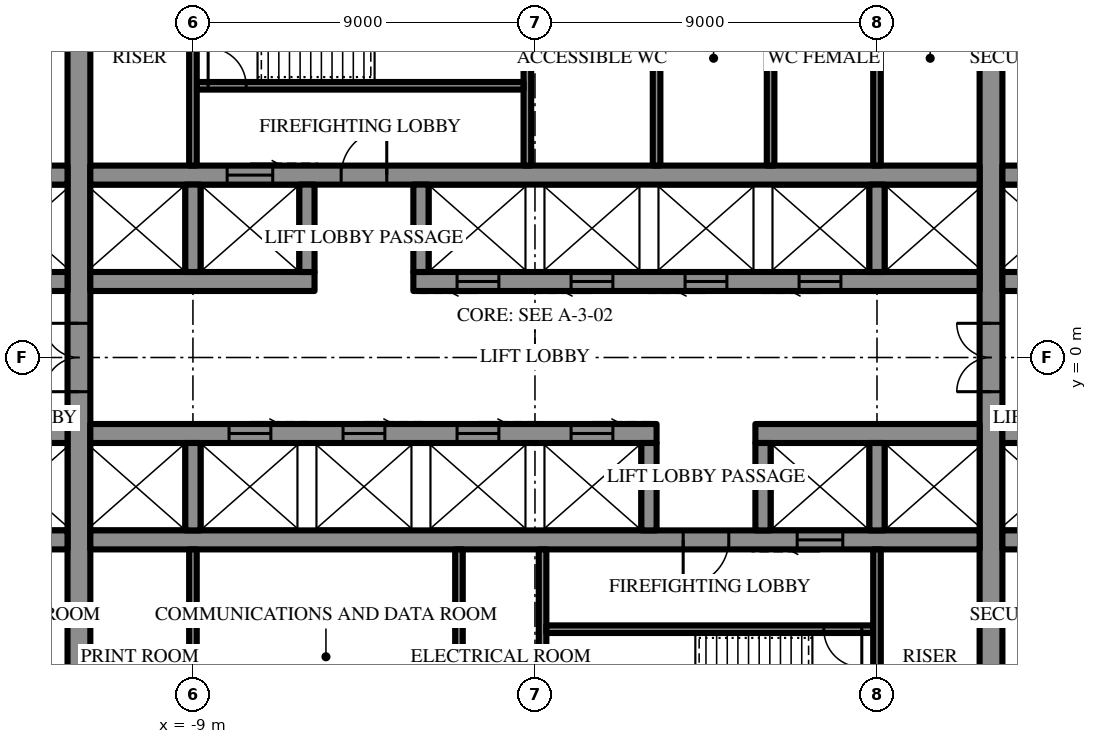
"""IFC4 building model, lengths in metres.
Left out: names, types, materials, properties, quantities, classifications, styles, units other than length and angle.
Written with IfcOpenShell. Run it as: python <this file> out.ifc"""

import sys

from ifc_helpers import new_model, si_unit, direction, frame, frame_2d, origin, place, context, subcontext, project, spatial, rectangle, extrude, element, fill, save


model = new_model("IFC4")
c1 = context("Model", 3, precision=1e-05, world=origin(), true_north=direction((0.0, 1.0)))
c2 = subcontext(c1, "Body", "Model", "MODEL_VIEW")
j1 = project(units=[si_unit("LENGTHUNIT", "METRE"), si_unit("PLANEANGLEUNIT", "RADIAN")], contexts=[c1])
p1 = place(None, origin())
s1 = spatial("IfcSite", under=j1, at=p1, CompositionType="ELEMENT")
p2 = place(p1, origin())
s2 = spatial("IfcBuilding", under=s1, at=p2, CompositionType="ELEMENT")
p3 = place(p2, frame((0.0, 0.0, 123.7)))
s3 = spatial("IfcBuildingStorey", under=s2, at=p3, CompositionType="ELEMENT", Elevation=123.7)
p4 = place(p3, frame((12.0, -10.7, 0.0), z_axis=(0.0, 0.0, 1.0), x_axis=(0.0, 1.0, 0.0)))
e1 = element("IfcWall", 1, at=p4, inside=s3, PredefinedType="SHEAR", context=c2, shape_type="SweptSolid", body=[
    extrude(rectangle(XDim=21.4, YDim=0.6, at=frame_2d((10.7, 0.0))), origin(), (0.0, 0.0, 1.0), 4.2),
])
p5 = place(p4, frame((9.8, 0.0, 0.0)))
e2 = element("IfcOpeningElement", 2, at=p5, cuts=e1, PredefinedType="OPENING", context=c2, shape_type="SweptSolid", body=[
    extrude(rectangle(XDim=1.8, YDim=2.4, at=frame_2d((0.9, 1.2))), frame((0.0, 0.31, 0.0), z_axis=(0.0, -1.0, 0.0), x_axis=(1.0, 0.0, 0.0)), (0.0, 0.0, 1.0), 0.62),
])
p6 = place(p3, frame((-12.0, -10.7, 0.0), z_axis=(0.0, 0.0, 1.0), x_axis=(0.0, 1.0, 0.0)))
e3 = element("IfcWall", 3, at=p6, inside=s3, PredefinedType="SHEAR", context=c2, shape_type="SweptSolid", body=[
    extrude(rectangle(XDim=21.4, YDim=0.6, at=frame_2d((10.7, 0.0))), origin(), (0.0, 0.0, 1.0), 4.2),
])
p7 = place(p6, frame((9.8, 0.0, 0.0)))
e4 = element("IfcOpeningElement", 4, at=p7, cuts=e3, PredefinedType="OPENING", context=c2, shape_type="SweptSolid", body=[
    extrude(rectangle(XDim=1.8, YDim=2.4, at=frame_2d((0.9, 1.2))), frame((0.0, 0.31, 0.0), z_axis=(0.0, -1.0, 0.0), x_axis=(1.0, 0.0, 0.0)), (0.0, 0.0, 1.0), 0.62),
])
p8 = place(p3, frame((-14.7, 2.0, 0.0), z_axis=(0.0, 0.0, 1.0), x_axis=(1.0, 0.0, 0.0)))
e5 = element("IfcWall", 5, at=p8, inside=s3, PredefinedType="SHEAR", context=c2, shape_type="SweptSolid", body=[
    extrude(rectangle(XDim=2.4, YDim=0.5, at=frame_2d((1.2, 0.0))), origin(), (0.0, 0.0, 1.0), 4.2),
])
p9 = place(p3, frame((-11.7, 2.0, 0.0), z_axis=(0.0, 0.0, 1.0), x_axis=(1.0, 0.0, 0.0)))
e6 = element("IfcWall", 6, at=p9, inside=s3, PredefinedType="SHEAR", context=c2, shape_type="SweptSolid", body=[
    extrude(rectangle(XDim=5.9, YDim=0.5, at=frame_2d((2.95, 0.0))), origin(), (0.0, 0.0, 1.0), 4.2),
])
p10 = place(p3, frame((-3.2, 2.0, 0.0), z_axis=(0.0, 0.0, 1.0), x_axis=(1.0, 0.0, 0.0)))
e7 = element("IfcWall", 7, at=p10, inside=s3, PredefinedType="SHEAR", context=c2, shape_type="SweptSolid", body=[
    extrude(rectangle(XDim=14.9, YDim=0.5, at=frame_2d((7.45, 0.0))), origin(), (0.0, 0.0, 1.0), 4.2),
])
p11 = place(p10, frame((1.15, 0.0, 0.0)))
e8 = element("IfcOpeningElement", 8, at=p11, cuts=e7, PredefinedType="OPENING", context=c2, shape_type="SweptSolid", body=[
    extrude(rectangle(XDim=1.1, YDim=2.2, at=frame_2d((0.55, 1.1))), frame((0.0, 0.26, 0.0), z_axis=(0.0, -1.0, 0.0), x_axis=(1.0, 0.0, 0.0)), (0.0, 0.0, 1.0), 0.52),
])
p12 = place(p10, frame((4.15, 0.0, 0.0)))
e9 = element("IfcOpeningElement", 9, at=p12, cuts=e7, PredefinedType="OPENING", context=c2, shape_type="SweptSolid", body=[
    extrude(rectangle(XDim=1.1, YDim=2.2, at=frame_2d((0.55, 1.1))), frame((0.0, 0.26, 0.0), z_axis=(0.0, -1.0, 0.0), x_axis=(1.0, 0.0, 0.0)), (0.0, 0.0, 1.0), 0.52),
])
p13 = place(p10, frame((7.15, 0.0, 0.0)))
e10 = element("IfcOpeningElement", 10, at=p13, cuts=e7, PredefinedType="OPENING", context=c2, shape_type="SweptSolid", body=[
    extrude(rectangle(XDim=1.1, YDim=2.2, at=frame_2d((0.55, 1.1))), frame((0.0, 0.26, 0.0), z_axis=(0.0, -1.0, 0.0), x_axis=(1.0, 0.0, 0.0)), (0.0, 0.0, 1.0), 0.52),
])
p14 = place(p10, frame((10.15, 0.0, 0.0)))
e11 = element("IfcOpeningElement", 11, at=p14, cuts=e7, PredefinedType="OPENING", context=c2, shape_type="SweptSolid", body=[
    extrude(rectangle(XDim=1.1, YDim=2.2, at=frame_2d((0.55, 1.1))), frame((0.0, 0.26, 0.0), z_axis=(0.0, -1.0, 0.0), x_axis=(1.0, 0.0, 0.0)), (0.0, 0.0, 1.0), 0.52),
])
for number, where, z_axis, x_axis in (
    (12, (12.3, 2.0, 0.0), (0.0, 0.0, 1.0), (1.0, 0.0, 0.0)),
    (13, (-14.7, 4.8, 0.0), (0.0, 0.0, 1.0), (1.0, 0.0, 0.0)),
):
    element("IfcWall", number, at=place(p3, frame(where, z_axis=z_axis, x_axis=x_axis)), inside=s3, PredefinedType="SHEAR", context=c2, shape_type="SweptSolid", body=[
        extrude(rectangle(XDim=2.4, YDim=0.5, at=frame_2d((1.2, 0.0))), origin(), (0.0, 0.0, 1.0), 4.2),
    ])
p15 = place(p3, frame((-11.7, 4.8, 0.0), z_axis=(0.0, 0.0, 1.0), x_axis=(1.0, 0.0, 0.0)))
e14 = element("IfcWall", 14, at=p15, inside=s3, PredefinedType="SHEAR", context=c2, shape_type="SweptSolid", body=[
    extrude(rectangle(XDim=23.4, YDim=0.5, at=frame_2d((11.7, 0.0))), origin(), (0.0, 0.0, 1.0), 4.2),
])
p16 = place(p15, frame((6.6, 0.0, 0.0)))
e15 = element("IfcOpeningElement", 15, at=p16, cuts=e14, PredefinedType="OPENING", context=c2, shape_type="SweptSolid", body=[
    extrude(rectangle(XDim=1.2, YDim=2.2, at=frame_2d((0.6, 1.1))), frame((0.0, 0.26, 0.0), z_axis=(0.0, -1.0, 0.0), x_axis=(1.0, 0.0, 0.0)), (0.0, 0.0, 1.0), 0.52),
])
p17 = place(p15, frame((3.6, 0.0, 0.0)))
e16 = element("IfcOpeningElement", 16, at=p17, cuts=e14, PredefinedType="OPENING", context=c2, shape_type="SweptSolid", body=[
    extrude(rectangle(XDim=1.2, YDim=2.2, at=frame_2d((0.6, 1.1))), frame((0.0, 0.26, 0.0), z_axis=(0.0, -1.0, 0.0), x_axis=(1.0, 0.0, 0.0)), (0.0, 0.0, 1.0), 0.52),
])
p18 = place(p3, frame((12.3, 4.8, 0.0), z_axis=(0.0, 0.0, 1.0), x_axis=(1.0, 0.0, 0.0)))
e17 = element("IfcWall", 17, at=p18, inside=s3, PredefinedType="SHEAR", context=c2, shape_type="SweptSolid", body=[
    extrude(rectangle(XDim=2.4, YDim=0.5, at=frame_2d((1.2, 0.0))), origin(), (0.0, 0.0, 1.0), 4.2),
])
for number, where, z_axis, x_axis in (
    (18, (-9.0, 2.25, 0.0), (0.0, 0.0, 1.0), (0.0, 1.0, 0.0)),
    (19, (-6.0, 2.25, 0.0), (0.0, 0.0, 1.0), (0.0, 1.0, 0.0)),
    (20, (-3.0, 2.25, 0.0), (0.0, 0.0, 1.0), (0.0, 1.0, 0.0)),
    (21, (9.0, 2.25, 0.0), (0.0, 0.0, 1.0), (0.0, 1.0, 0.0)),
):
    element("IfcWall", number, at=place(p3, frame(where, z_axis=z_axis, x_axis=x_axis)), inside=s3, PredefinedType="SHEAR", context=c2, shape_type="SweptSolid", body=[
        extrude(rectangle(XDim=2.3, YDim=0.4, at=frame_2d((1.15, 0.0))), origin(), (0.0, 0.0, 1.0), 4.2),
    ])
p19 = place(p3, frame((-0.2, 5.05, 0.0), z_axis=(0.0, 0.0, 1.0), x_axis=(0.0, 1.0, 0.0)))
e22 = element("IfcWall", 22, at=p19, inside=s3, PredefinedType="SHEAR", context=c2, shape_type="SweptSolid", body=[
    extrude(rectangle(XDim=5.65, YDim=0.2, at=frame_2d((2.825, 0.0))), origin(), (0.0, 0.0, 1.0), 4.2),
])
p20 = place(p3, frame((-8.9, 7.15, 0.0), z_axis=(0.0, 0.0, 1.0), x_axis=(1.0, 0.0, 0.0)))
e23 = element("IfcWall", 23, at=p20, inside=s3, PredefinedType="SHEAR", context=c2, shape_type="SweptSolid", body=[
    extrude(rectangle(XDim=8.6, YDim=0.2, at=frame_2d((4.3, 0.0))), origin(), (0.0, 0.0, 1.0), 4.2),
])
p21 = place(p20, frame((0.3, 0.0, 0.0)))
e24 = element("IfcOpeningElement", 24, at=p21, cuts=e23, PredefinedType="OPENING", context=c2, shape_type="SweptSolid", body=[
    extrude(rectangle(XDim=1.0, YDim=2.2, at=frame_2d((0.5, 1.1))), frame((0.0, 0.11, 0.0), z_axis=(0.0, -1.0, 0.0), x_axis=(1.0, 0.0, 0.0)), (0.0, 0.0, 1.0), 0.22),
])
p22 = place(p3, frame((14.7, -2.0, 0.0), z_axis=(0.0, 0.0, 1.0), x_axis=(-1.0, 0.0, 0.0)))
e25 = element("IfcWall", 25, at=p22, inside=s3, PredefinedType="SHEAR", context=c2, shape_type="SweptSolid", body=[
    extrude(rectangle(XDim=2.4, YDim=0.5, at=frame_2d((1.2, 0.0))), origin(), (0.0, 0.0, 1.0), 4.2),
])
p23 = place(p3, frame((11.7, -2.0, 0.0), z_axis=(0.0, 0.0, 1.0), x_axis=(-1.0, 0.0, 0.0)))
e26 = element("IfcWall", 26, at=p23, inside=s3, PredefinedType="SHEAR", context=c2, shape_type="SweptSolid", body=[
    extrude(rectangle(XDim=5.9, YDim=0.5, at=frame_2d((2.95, 0.0))), origin(), (0.0, 0.0, 1.0), 4.2),
])
p24 = place(p3, frame((3.2, -2.0, 0.0), z_axis=(0.0, 0.0, 1.0), x_axis=(-1.0, 0.0, 0.0)))
e27 = element("IfcWall", 27, at=p24, inside=s3, PredefinedType="SHEAR", context=c2, shape_type="SweptSolid", body=[
    extrude(rectangle(XDim=14.9, YDim=0.5, at=frame_2d((7.45, 0.0))), origin(), (0.0, 0.0, 1.0), 4.2),
])
p25 = place(p24, frame((1.15, 0.0, 0.0)))
e28 = element("IfcOpeningElement", 28, at=p25, cuts=e27, PredefinedType="OPENING", context=c2, shape_type="SweptSolid", body=[
    extrude(rectangle(XDim=1.1, YDim=2.2, at=frame_2d((0.55, 1.1))), frame((0.0, 0.26, 0.0), z_axis=(0.0, -1.0, 0.0), x_axis=(1.0, 0.0, 0.0)), (0.0, 0.0, 1.0), 0.52),
])
p26 = place(p24, frame((4.15, 0.0, 0.0)))
e29 = element("IfcOpeningElement", 29, at=p26, cuts=e27, PredefinedType="OPENING", context=c2, shape_type="SweptSolid", body=[
    extrude(rectangle(XDim=1.1, YDim=2.2, at=frame_2d((0.55, 1.1))), frame((0.0, 0.26, 0.0), z_axis=(0.0, -1.0, 0.0), x_axis=(1.0, 0.0, 0.0)), (0.0, 0.0, 1.0), 0.52),
])
p27 = place(p24, frame((7.15, 0.0, 0.0)))
e30 = element("IfcOpeningElement", 30, at=p27, cuts=e27, PredefinedType="OPENING", context=c2, shape_type="SweptSolid", body=[
    extrude(rectangle(XDim=1.1, YDim=2.2, at=frame_2d((0.55, 1.1))), frame((0.0, 0.26, 0.0), z_axis=(0.0, -1.0, 0.0), x_axis=(1.0, 0.0, 0.0)), (0.0, 0.0, 1.0), 0.52),
])
p28 = place(p24, frame((10.15, 0.0, 0.0)))
e31 = element("IfcOpeningElement", 31, at=p28, cuts=e27, PredefinedType="OPENING", context=c2, shape_type="SweptSolid", body=[
    extrude(rectangle(XDim=1.1, YDim=2.2, at=frame_2d((0.55, 1.1))), frame((0.0, 0.26, 0.0), z_axis=(0.0, -1.0, 0.0), x_axis=(1.0, 0.0, 0.0)), (0.0, 0.0, 1.0), 0.52),
])
for number, where, z_axis, x_axis in (
    (32, (-12.3, -2.0, 0.0), (0.0, 0.0, 1.0), (-1.0, 0.0, 0.0)),
    (33, (14.7, -4.8, 0.0), (0.0, 0.0, 1.0), (-1.0, 0.0, 0.0)),
):
    element("IfcWall", number, at=place(p3, frame(where, z_axis=z_axis, x_axis=x_axis)), inside=s3, PredefinedType="SHEAR", context=c2, shape_type="SweptSolid", body=[
        extrude(rectangle(XDim=2.4, YDim=0.5, at=frame_2d((1.2, 0.0))), origin(), (0.0, 0.0, 1.0), 4.2),
    ])
p29 = place(p3, frame((11.7, -4.8, 0.0), z_axis=(0.0, 0.0, 1.0), x_axis=(-1.0, 0.0, 0.0)))
e34 = element("IfcWall", 34, at=p29, inside=s3, PredefinedType="SHEAR", context=c2, shape_type="SweptSolid", body=[
    extrude(rectangle(XDim=23.4, YDim=0.5, at=frame_2d((11.7, 0.0))), origin(), (0.0, 0.0, 1.0), 4.2),
])
p30 = place(p29, frame((6.6, 0.0, 0.0)))
e35 = element("IfcOpeningElement", 35, at=p30, cuts=e34, PredefinedType="OPENING", context=c2, shape_type="SweptSolid", body=[
    extrude(rectangle(XDim=1.2, YDim=2.2, at=frame_2d((0.6, 1.1))), frame((0.0, 0.26, 0.0), z_axis=(0.0, -1.0, 0.0), x_axis=(1.0, 0.0, 0.0)), (0.0, 0.0, 1.0), 0.52),
])
p31 = place(p29, frame((3.6, 0.0, 0.0)))
e36 = element("IfcOpeningElement", 36, at=p31, cuts=e34, PredefinedType="OPENING", context=c2, shape_type="SweptSolid", body=[
    extrude(rectangle(XDim=1.2, YDim=2.2, at=frame_2d((0.6, 1.1))), frame((0.0, 0.26, 0.0), z_axis=(0.0, -1.0, 0.0), x_axis=(1.0, 0.0, 0.0)), (0.0, 0.0, 1.0), 0.52),
])
p32 = place(p3, frame((-12.3, -4.8, 0.0), z_axis=(0.0, 0.0, 1.0), x_axis=(-1.0, 0.0, 0.0)))
e37 = element("IfcWall", 37, at=p32, inside=s3, PredefinedType="SHEAR", context=c2, shape_type="SweptSolid", body=[
    extrude(rectangle(XDim=2.4, YDim=0.5, at=frame_2d((1.2, 0.0))), origin(), (0.0, 0.0, 1.0), 4.2),
])
for number, where, z_axis, x_axis in (
    (38, (9.0, -2.25, 0.0), (0.0, 0.0, 1.0), (0.0, -1.0, 0.0)),
    (39, (6.0, -2.25, 0.0), (0.0, 0.0, 1.0), (0.0, -1.0, 0.0)),
    (40, (3.0, -2.25, 0.0), (0.0, 0.0, 1.0), (0.0, -1.0, 0.0)),
    (41, (-9.0, -2.25, 0.0), (0.0, 0.0, 1.0), (0.0, -1.0, 0.0)),
):
    element("IfcWall", number, at=place(p3, frame(where, z_axis=z_axis, x_axis=x_axis)), inside=s3, PredefinedType="SHEAR", context=c2, shape_type="SweptSolid", body=[
        extrude(rectangle(XDim=2.3, YDim=0.4, at=frame_2d((1.15, 0.0))), origin(), (0.0, 0.0, 1.0), 4.2),
    ])
p33 = place(p3, frame((0.2, -5.05, 0.0), z_axis=(0.0, 0.0, 1.0), x_axis=(0.0, -1.0, 0.0)))
e42 = element("IfcWall", 42, at=p33, inside=s3, PredefinedType="SHEAR", context=c2, shape_type="SweptSolid", body=[
    extrude(rectangle(XDim=5.65, YDim=0.2, at=frame_2d((2.825, 0.0))), origin(), (0.0, 0.0, 1.0), 4.2),
])
p34 = place(p3, frame((8.9, -7.15, 0.0), z_axis=(0.0, 0.0, 1.0), x_axis=(-1.0, 0.0, 0.0)))
e43 = element("IfcWall", 43, at=p34, inside=s3, PredefinedType="SHEAR", context=c2, shape_type="SweptSolid", body=[
    extrude(rectangle(XDim=8.6, YDim=0.2, at=frame_2d((4.3, 0.0))), origin(), (0.0, 0.0, 1.0), 4.2),
])
p35 = place(p34, frame((0.3, 0.0, 0.0)))
e44 = element("IfcOpeningElement", 44, at=p35, cuts=e43, PredefinedType="OPENING", context=c2, shape_type="SweptSolid", body=[
    extrude(rectangle(XDim=1.0, YDim=2.2, at=frame_2d((0.5, 1.1))), frame((0.0, 0.11, 0.0), z_axis=(0.0, -1.0, 0.0), x_axis=(1.0, 0.0, 0.0)), (0.0, 0.0, 1.0), 0.22),
])
for number, where, z_axis, x_axis in (
    (45, (-9.0, 5.05, 0.0), (0.0, 0.0, 1.0), (0.0, 1.0, 0.0)),
    (46, (9.0, 5.05, 0.0), (0.0, 0.0, 1.0), (0.0, 1.0, 0.0)),
    (47, (3.2, 5.05, 0.0), (0.0, 0.0, 1.0), (0.0, 1.0, 0.0)),
    (48, (6.2, 5.05, 0.0), (0.0, 0.0, 1.0), (0.0, 1.0, 0.0)),
    (49, (9.0, -5.05, 0.0), (0.0, 0.0, 1.0), (0.0, -1.0, 0.0)),
    (50, (-9.0, -5.05, 0.0), (0.0, 0.0, 1.0), (0.0, -1.0, 0.0)),
    (51, (-2.0, -5.05, 0.0), (0.0, 0.0, 1.0), (0.0, -1.0, 0.0)),
):
    element("IfcWall", number, at=place(p3, frame(where, z_axis=z_axis, x_axis=x_axis)), inside=s3, PredefinedType="PARTITIONING", context=c2, shape_type="SweptSolid", body=[
        extrude(rectangle(XDim=5.65, YDim=0.2, at=frame_2d((2.825, 0.0))), origin(), (0.0, 0.0, 1.0), 4.0),
    ])
p36 = place(p16, origin())
e52 = element("IfcDoor", 52, at=p36, inside=s3, OperationType="SINGLE_SWING_LEFT", PredefinedType="DOOR", context=c2, shape_type="SweptSolid", body=[
    extrude(rectangle(XDim=1.2, YDim=2.2, at=frame_2d((0.6, 1.1))), frame((0.0, 0.025, 0.0), z_axis=(0.0, -1.0, 0.0), x_axis=(1.0, 0.0, 0.0)), (0.0, 0.0, 1.0), 0.05),
])
fill(e15, e52)
p37 = place(p21, origin())
e53 = element("IfcDoor", 53, at=p37, inside=s3, OperationType="SINGLE_SWING_RIGHT", PredefinedType="DOOR", context=c2, shape_type="SweptSolid", body=[
    extrude(rectangle(XDim=1.0, YDim=2.2, at=frame_2d((0.5, 1.1))), frame((0.0, 0.025, 0.0), z_axis=(0.0, -1.0, 0.0), x_axis=(1.0, 0.0, 0.0)), (0.0, 0.0, 1.0), 0.05),
])
fill(e24, e53)
p38 = place(p30, origin())
e54 = element("IfcDoor", 54, at=p38, inside=s3, OperationType="SINGLE_SWING_LEFT", PredefinedType="DOOR", context=c2, shape_type="SweptSolid", body=[
    extrude(rectangle(XDim=1.2, YDim=2.2, at=frame_2d((0.6, 1.1))), frame((0.0, 0.025, 0.0), z_axis=(0.0, -1.0, 0.0), x_axis=(1.0, 0.0, 0.0)), (0.0, 0.0, 1.0), 0.05),
])
fill(e35, e54)
p39 = place(p35, origin())
e55 = element("IfcDoor", 55, at=p39, inside=s3, OperationType="SINGLE_SWING_RIGHT", PredefinedType="DOOR", context=c2, shape_type="SweptSolid", body=[
    extrude(rectangle(XDim=1.0, YDim=2.2, at=frame_2d((0.5, 1.1))), frame((0.0, 0.025, 0.0), z_axis=(0.0, -1.0, 0.0), x_axis=(1.0, 0.0, 0.0)), (0.0, 0.0, 1.0), 0.05),
])
fill(e44, e55)
p40 = place(p5, origin())
e56 = element("IfcDoor", 56, at=p40, inside=s3, OperationType="DOUBLE_DOOR_SINGLE_SWING", PredefinedType="DOOR", context=c2, shape_type="SweptSolid", body=[
    extrude(rectangle(XDim=1.8, YDim=2.4, at=frame_2d((0.9, 1.2))), frame((0.0, 0.025, 0.0), z_axis=(0.0, -1.0, 0.0), x_axis=(1.0, 0.0, 0.0)), (0.0, 0.0, 1.0), 0.05),
])
fill(e2, e56)
p41 = place(p7, origin())
e57 = element("IfcDoor", 57, at=p41, inside=s3, OperationType="DOUBLE_DOOR_SINGLE_SWING", PredefinedType="DOOR", context=c2, shape_type="SweptSolid", body=[
    extrude(rectangle(XDim=1.8, YDim=2.4, at=frame_2d((0.9, 1.2))), frame((0.0, 0.025, 0.0), z_axis=(0.0, -1.0, 0.0), x_axis=(1.0, 0.0, 0.0)), (0.0, 0.0, 1.0), 0.05),
])
fill(e4, e57)
p42 = place(p17, origin())
e58 = element("IfcDoor", 58, at=p42, inside=s3, OperationType="SLIDING_TO_LEFT", PredefinedType="DOOR", context=c2, shape_type="SweptSolid", body=[
    extrude(rectangle(XDim=1.2, YDim=2.2, at=frame_2d((0.6, 1.1))), frame((0.0, 0.025, 0.0), z_axis=(0.0, -1.0, 0.0), x_axis=(1.0, 0.0, 0.0)), (0.0, 0.0, 1.0), 0.05),
])
fill(e16, e58)
p43 = place(p11, frame((1.1, 0.0, 0.0), z_axis=(0.0, 0.0, 1.0), x_axis=(-1.0, 0.0, 0.0)))
e59 = element("IfcDoor", 59, at=p43, inside=s3, OperationType="SLIDING_TO_LEFT", PredefinedType="DOOR", context=c2, shape_type="SweptSolid", body=[
    extrude(rectangle(XDim=1.1, YDim=2.2, at=frame_2d((0.55, 1.1))), frame((0.0, 0.025, 0.0), z_axis=(0.0, -1.0, 0.0), x_axis=(1.0, 0.0, 0.0)), (0.0, 0.0, 1.0), 0.05),
])
fill(e8, e59)
p44 = place(p12, frame((1.1, 0.0, 0.0), z_axis=(0.0, 0.0, 1.0), x_axis=(-1.0, 0.0, 0.0)))
e60 = element("IfcDoor", 60, at=p44, inside=s3, OperationType="SLIDING_TO_LEFT", PredefinedType="DOOR", context=c2, shape_type="SweptSolid", body=[
    extrude(rectangle(XDim=1.1, YDim=2.2, at=frame_2d((0.55, 1.1))), frame((0.0, 0.025, 0.0), z_axis=(0.0, -1.0, 0.0), x_axis=(1.0, 0.0, 0.0)), (0.0, 0.0, 1.0), 0.05),
])
fill(e9, e60)
p45 = place(p13, frame((1.1, 0.0, 0.0), z_axis=(0.0, 0.0, 1.0), x_axis=(-1.0, 0.0, 0.0)))
e61 = element("IfcDoor", 61, at=p45, inside=s3, OperationType="SLIDING_TO_LEFT", PredefinedType="DOOR", context=c2, shape_type="SweptSolid", body=[
    extrude(rectangle(XDim=1.1, YDim=2.2, at=frame_2d((0.55, 1.1))), frame((0.0, 0.025, 0.0), z_axis=(0.0, -1.0, 0.0), x_axis=(1.0, 0.0, 0.0)), (0.0, 0.0, 1.0), 0.05),
])
fill(e10, e61)
p46 = place(p14, frame((1.1, 0.0, 0.0), z_axis=(0.0, 0.0, 1.0), x_axis=(-1.0, 0.0, 0.0)))
e62 = element("IfcDoor", 62, at=p46, inside=s3, OperationType="SLIDING_TO_LEFT", PredefinedType="DOOR", context=c2, shape_type="SweptSolid", body=[
    extrude(rectangle(XDim=1.1, YDim=2.2, at=frame_2d((0.55, 1.1))), frame((0.0, 0.025, 0.0), z_axis=(0.0, -1.0, 0.0), x_axis=(1.0, 0.0, 0.0)), (0.0, 0.0, 1.0), 0.05),
])
fill(e11, e62)
p47 = place(p31, origin())
e63 = element("IfcDoor", 63, at=p47, inside=s3, OperationType="SLIDING_TO_LEFT", PredefinedType="DOOR", context=c2, shape_type="SweptSolid", body=[
    extrude(rectangle(XDim=1.2, YDim=2.2, at=frame_2d((0.6, 1.1))), frame((0.0, 0.025, 0.0), z_axis=(0.0, -1.0, 0.0), x_axis=(1.0, 0.0, 0.0)), (0.0, 0.0, 1.0), 0.05),
])
fill(e36, e63)
p48 = place(p25, frame((1.1, 0.0, 0.0), z_axis=(0.0, 0.0, 1.0), x_axis=(-1.0, 0.0, 0.0)))
e64 = element("IfcDoor", 64, at=p48, inside=s3, OperationType="SLIDING_TO_LEFT", PredefinedType="DOOR", context=c2, shape_type="SweptSolid", body=[
    extrude(rectangle(XDim=1.1, YDim=2.2, at=frame_2d((0.55, 1.1))), frame((0.0, 0.025, 0.0), z_axis=(0.0, -1.0, 0.0), x_axis=(1.0, 0.0, 0.0)), (0.0, 0.0, 1.0), 0.05),
])
fill(e28, e64)
p49 = place(p26, frame((1.1, 0.0, 0.0), z_axis=(0.0, 0.0, 1.0), x_axis=(-1.0, 0.0, 0.0)))
e65 = element("IfcDoor", 65, at=p49, inside=s3, OperationType="SLIDING_TO_LEFT", PredefinedType="DOOR", context=c2, shape_type="SweptSolid", body=[
    extrude(rectangle(XDim=1.1, YDim=2.2, at=frame_2d((0.55, 1.1))), frame((0.0, 0.025, 0.0), z_axis=(0.0, -1.0, 0.0), x_axis=(1.0, 0.0, 0.0)), (0.0, 0.0, 1.0), 0.05),
])
fill(e29, e65)
p50 = place(p27, frame((1.1, 0.0, 0.0), z_axis=(0.0, 0.0, 1.0), x_axis=(-1.0, 0.0, 0.0)))
e66 = element("IfcDoor", 66, at=p50, inside=s3, OperationType="SLIDING_TO_LEFT", PredefinedType="DOOR", context=c2, shape_type="SweptSolid", body=[
    extrude(rectangle(XDim=1.1, YDim=2.2, at=frame_2d((0.55, 1.1))), frame((0.0, 0.025, 0.0), z_axis=(0.0, -1.0, 0.0), x_axis=(1.0, 0.0, 0.0)), (0.0, 0.0, 1.0), 0.05),
])
fill(e30, e66)
p51 = place(p28, frame((1.1, 0.0, 0.0), z_axis=(0.0, 0.0, 1.0), x_axis=(-1.0, 0.0, 0.0)))
e67 = element("IfcDoor", 67, at=p51, inside=s3, OperationType="SLIDING_TO_LEFT", PredefinedType="DOOR", context=c2, shape_type="SweptSolid", body=[
    extrude(rectangle(XDim=1.1, YDim=2.2, at=frame_2d((0.55, 1.1))), frame((0.0, 0.025, 0.0), z_axis=(0.0, -1.0, 0.0), x_axis=(1.0, 0.0, 0.0)), (0.0, 0.0, 1.0), 0.05),
])
fill(e31, e67)
save(model, sys.argv[1])
